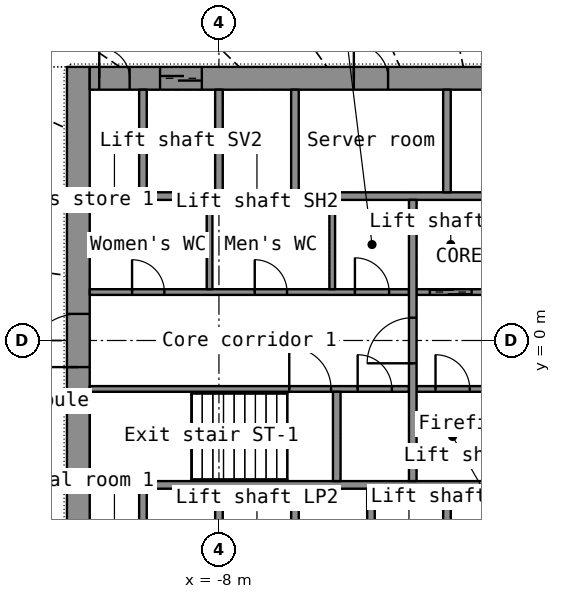
"""IFC4 building model, lengths in metres.
Left out: names, types, materials, properties, quantities, classifications, styles, units other than length and angle.
Written with IfcOpenShell. Run it as: python <this file> out.ifc"""

import sys

from ifc_helpers import new_model, si_unit, direction, frame, frame_2d, origin, place, context, subcontext, project, spatial, rectangle, extrude, element, fill, save


model = new_model("IFC4")
c1 = context("Model", 3, precision=1e-05, world=origin(), true_north=direction((0.0, 1.0)))
c2 = subcontext(c1, "Body", "Model", "MODEL_VIEW")
j1 = project(units=[si_unit("LENGTHUNIT", "METRE"), si_unit("PLANEANGLEUNIT", "RADIAN")], contexts=[c1])
p1 = place(None, origin())
s1 = spatial("IfcSite", under=j1, at=p1, CompositionType="ELEMENT")
p2 = place(p1, origin())
s2 = spatial("IfcBuilding", under=s1, at=p2, CompositionType="ELEMENT")
p3 = place(p2, frame((0.0, 0.0, 7.0)))
s3 = spatial("IfcBuildingStorey", under=s2, at=p3, CompositionType="ELEMENT", Elevation=7.0)
p4 = place(p3, frame((-11.7, -7.2, 0.0), z_axis=(0.0, 0.0, 1.0), x_axis=(0.0, 1.0, 0.0)))
e1 = element("IfcWall", 1, at=p4, inside=s3, PredefinedType="SHEAR", context=c2, shape_type="SweptSolid", body=[
    extrude(rectangle(XDim=14.4, YDim=0.6, at=frame_2d((7.2, 0.0))), origin(), (0.0, 0.0, 1.0), 6.1),
])
p5 = place(p4, frame((6.5, 0.0, 0.0)))
e2 = element("IfcOpeningElement", 2, at=p5, cuts=e1, PredefinedType="OPENING", context=c2, shape_type="SweptSolid", body=[
    extrude(rectangle(XDim=1.4, YDim=2.2, at=frame_2d((0.7, 1.1))), frame((0.0, 0.31, 0.0), z_axis=(0.0, -1.0, 0.0), x_axis=(1.0, 0.0, 0.0)), (0.0, 0.0, 1.0), 0.62),
])
p6 = place(p3, frame((-11.4, 6.9, 0.0), z_axis=(0.0, 0.0, 1.0), x_axis=(1.0, 0.0, 0.0)))
e3 = element("IfcWall", 3, at=p6, inside=s3, PredefinedType="SHEAR", context=c2, shape_type="SweptSolid", body=[
    extrude(rectangle(XDim=22.8, YDim=0.6, at=frame_2d((11.4, 0.0))), origin(), (0.0, 0.0, 1.0), 6.1),
])
p7 = place(p6, frame((1.85, 0.0, 0.0)))
e4 = element("IfcOpeningElement", 4, at=p7, cuts=e3, PredefinedType="OPENING", context=c2, shape_type="SweptSolid", body=[
    extrude(rectangle(XDim=1.1, YDim=2.2, at=frame_2d((0.55, 1.1))), frame((0.0, 0.31, 0.0), z_axis=(0.0, -1.0, 0.0), x_axis=(1.0, 0.0, 0.0)), (0.0, 0.0, 1.0), 0.62),
])
p8 = place(p6, frame((6.95, 0.0, 0.0)))
e5 = element("IfcOpeningElement", 5, at=p8, cuts=e3, PredefinedType="OPENING", context=c2, shape_type="SweptSolid", body=[
    extrude(rectangle(XDim=0.9, YDim=2.1, at=frame_2d((0.45, 1.05))), frame((0.0, 0.31, 0.0), z_axis=(0.0, -1.0, 0.0), x_axis=(1.0, 0.0, 0.0)), (0.0, 0.0, 1.0), 0.62),
])
p9 = place(p6, frame((11.95, 0.0, 0.0)))
e6 = element("IfcOpeningElement", 6, at=p9, cuts=e3, PredefinedType="OPENING", context=c2, shape_type="SweptSolid", body=[
    extrude(rectangle(XDim=0.9, YDim=2.1, at=frame_2d((0.45, 1.05))), frame((0.0, 0.31, 0.0), z_axis=(0.0, -1.0, 0.0), x_axis=(1.0, 0.0, 0.0)), (0.0, 0.0, 1.0), 0.62),
])
p10 = place(p6, frame((17.95, 0.0, 0.0)))
e7 = element("IfcOpeningElement", 7, at=p10, cuts=e3, PredefinedType="OPENING", context=c2, shape_type="SweptSolid", body=[
    extrude(rectangle(XDim=0.9, YDim=2.1, at=frame_2d((0.45, 1.05))), frame((0.0, 0.31, 0.0), z_axis=(0.0, -1.0, 0.0), x_axis=(1.0, 0.0, 0.0)), (0.0, 0.0, 1.0), 0.62),
])
p11 = place(p6, frame((0.25, 0.0, 0.0)))
e8 = element("IfcOpeningElement", 8, at=p11, cuts=e3, PredefinedType="OPENING", context=c2, shape_type="SweptSolid", body=[
    extrude(rectangle(XDim=0.8, YDim=2.05, at=frame_2d((0.4, 1.025))), frame((0.0, 0.31, 0.0), z_axis=(0.0, -1.0, 0.0), x_axis=(1.0, 0.0, 0.0)), (0.0, 0.0, 1.0), 0.62),
])
p12 = place(p6, frame((21.75, 0.0, 0.0)))
e9 = element("IfcOpeningElement", 9, at=p12, cuts=e3, PredefinedType="OPENING", context=c2, shape_type="SweptSolid", body=[
    extrude(rectangle(XDim=0.8, YDim=2.05, at=frame_2d((0.4, 1.025))), frame((0.0, 0.31, 0.0), z_axis=(0.0, -1.0, 0.0), x_axis=(1.0, 0.0, 0.0)), (0.0, 0.0, 1.0), 0.62),
])
for number, where, z_axis, x_axis in (
    (10, (-11.4, -3.8, 0.0), (0.0, 0.0, 1.0), (1.0, 0.0, 0.0)),
    (11, (-11.4, 3.8, 0.0), (0.0, 0.0, 1.0), (1.0, 0.0, 0.0)),
):
    element("IfcWall", number, at=place(p3, frame(where, z_axis=z_axis, x_axis=x_axis)), inside=s3, PredefinedType="SHEAR", context=c2, shape_type="SweptSolid", body=[
        extrude(rectangle(XDim=22.8, YDim=0.2, at=frame_2d((11.4, 0.0))), origin(), (0.0, 0.0, 1.0), 6.1),
    ])
for number, where, z_axis, x_axis in (
    (12, (-10.0, -6.6, 0.0), (0.0, 0.0, 1.0), (0.0, 1.0, 0.0)),
    (13, (-8.0, -6.6, 0.0), (0.0, 0.0, 1.0), (0.0, 1.0, 0.0)),
    (14, (-6.0, -6.6, 0.0), (0.0, 0.0, 1.0), (0.0, 1.0, 0.0)),
    (15, (-4.0, -6.6, 0.0), (0.0, 0.0, 1.0), (0.0, 1.0, 0.0)),
    (16, (-2.0, -6.6, 0.0), (0.0, 0.0, 1.0), (0.0, 1.0, 0.0)),
    (17, (-10.0, 3.9, 0.0), (0.0, 0.0, 1.0), (0.0, 1.0, 0.0)),
    (18, (-8.0, 3.9, 0.0), (0.0, 0.0, 1.0), (0.0, 1.0, 0.0)),
    (19, (-6.0, 3.9, 0.0), (0.0, 0.0, 1.0), (0.0, 1.0, 0.0)),
):
    element("IfcWall", number, at=place(p3, frame(where, z_axis=z_axis, x_axis=x_axis)), inside=s3, PredefinedType="SHEAR", context=c2, shape_type="SweptSolid", body=[
        extrude(rectangle(XDim=2.7, YDim=0.2, at=frame_2d((1.35, 0.0))), origin(), (0.0, 0.0, 1.0), 6.1),
    ])
p13 = place(p3, frame((-2.0, 3.9, 0.0), z_axis=(0.0, 0.0, 1.0), x_axis=(0.0, 1.0, 0.0)))
e20 = element("IfcWall", 20, at=p13, inside=s3, PredefinedType="PARTITIONING", context=c2, shape_type="SweptSolid", body=[
    extrude(rectangle(XDim=2.7, YDim=0.2, at=frame_2d((1.35, 0.0))), origin(), (0.0, 0.0, 1.0), 6.1),
])
p14 = place(p3, frame((-11.4, -1.275, 0.0), z_axis=(0.0, 0.0, 1.0), x_axis=(1.0, 0.0, 0.0)))
e21 = element("IfcWall", 21, at=p14, inside=s3, PredefinedType="SHEAR", context=c2, shape_type="SweptSolid", body=[
    extrude(rectangle(XDim=8.4, YDim=0.15, at=frame_2d((4.2, 0.0))), origin(), (0.0, 0.0, 1.0), 6.1),
])
p15 = place(p14, frame((5.25, 0.0, 0.0)))
e22 = element("IfcOpeningElement", 22, at=p15, cuts=e21, PredefinedType="OPENING", context=c2, shape_type="SweptSolid", body=[
    extrude(rectangle(XDim=1.1, YDim=2.15, at=frame_2d((0.55, 1.075))), frame((0.0, 0.085, 0.0), z_axis=(0.0, -1.0, 0.0), x_axis=(1.0, 0.0, 0.0)), (0.0, 0.0, 1.0), 0.17),
])
p16 = place(p14, frame((7.05, 0.0, 0.0)))
e23 = element("IfcOpeningElement", 23, at=p16, cuts=e21, PredefinedType="OPENING", context=c2, shape_type="SweptSolid", body=[
    extrude(rectangle(XDim=0.9, YDim=2.1, at=frame_2d((0.45, 1.05))), frame((0.0, 0.085, 0.0), z_axis=(0.0, -1.0, 0.0), x_axis=(1.0, 0.0, 0.0)), (0.0, 0.0, 1.0), 0.17),
])
p17 = place(p3, frame((-2.8, -1.275, 0.0), z_axis=(0.0, 0.0, 1.0), x_axis=(1.0, 0.0, 0.0)))
e24 = element("IfcWall", 24, at=p17, inside=s3, PredefinedType="SHEAR", context=c2, shape_type="SweptSolid", body=[
    extrude(rectangle(XDim=5.6, YDim=0.15, at=frame_2d((2.8, 0.0))), origin(), (0.0, 0.0, 1.0), 6.1),
])
p18 = place(p17, frame((4.15, 0.0, 0.0)))
e25 = element("IfcOpeningElement", 25, at=p18, cuts=e24, PredefinedType="OPENING", context=c2, shape_type="SweptSolid", body=[
    extrude(rectangle(XDim=1.1, YDim=2.2, at=frame_2d((0.55, 1.1))), frame((0.0, 0.085, 0.0), z_axis=(0.0, -1.0, 0.0), x_axis=(1.0, 0.0, 0.0)), (0.0, 0.0, 1.0), 0.17),
])
p19 = place(p17, frame((0.499, 0.0, 0.0)))
e26 = element("IfcOpeningElement", 26, at=p19, cuts=e24, PredefinedType="OPENING", context=c2, shape_type="SweptSolid", body=[
    extrude(rectangle(XDim=0.9, YDim=2.1, at=frame_2d((0.45, 1.05))), frame((0.0, 0.085, 0.0), z_axis=(0.0, -1.0, 0.0), x_axis=(1.0, 0.0, 0.0)), (0.0, 0.0, 1.0), 0.17),
])
p20 = place(p17, frame((2.374, 0.0, 0.0)))
e27 = element("IfcOpeningElement", 27, at=p20, cuts=e24, PredefinedType="OPENING", context=c2, shape_type="SweptSolid", body=[
    extrude(rectangle(XDim=0.9, YDim=2.1, at=frame_2d((0.45, 1.05))), frame((0.0, 0.085, 0.0), z_axis=(0.0, -1.0, 0.0), x_axis=(1.0, 0.0, 0.0)), (0.0, 0.0, 1.0), 0.17),
])
p21 = place(p3, frame((-11.4, 1.275, 0.0), z_axis=(0.0, 0.0, 1.0), x_axis=(1.0, 0.0, 0.0)))
e28 = element("IfcWall", 28, at=p21, inside=s3, PredefinedType="PARTITIONING", context=c2, shape_type="SweptSolid", body=[
    extrude(rectangle(XDim=8.4, YDim=0.15, at=frame_2d((4.2, 0.0))), origin(), (0.0, 0.0, 1.0), 6.1),
])
p22 = place(p21, frame((1.114, 0.0, 0.0)))
e29 = element("IfcOpeningElement", 29, at=p22, cuts=e28, PredefinedType="OPENING", context=c2, shape_type="SweptSolid", body=[
    extrude(rectangle(XDim=0.85, YDim=2.1, at=frame_2d((0.425, 1.05))), frame((0.0, 0.085, 0.0), z_axis=(0.0, -1.0, 0.0), x_axis=(1.0, 0.0, 0.0)), (0.0, 0.0, 1.0), 0.17),
])
p23 = place(p21, frame((4.342, 0.0, 0.0)))
e30 = element("IfcOpeningElement", 30, at=p23, cuts=e28, PredefinedType="OPENING", context=c2, shape_type="SweptSolid", body=[
    extrude(rectangle(XDim=0.85, YDim=2.1, at=frame_2d((0.425, 1.05))), frame((0.0, 0.085, 0.0), z_axis=(0.0, -1.0, 0.0), x_axis=(1.0, 0.0, 0.0)), (0.0, 0.0, 1.0), 0.17),
])
p24 = place(p21, frame((6.978, 0.0, 0.0)))
e31 = element("IfcOpeningElement", 31, at=p24, cuts=e28, PredefinedType="OPENING", context=c2, shape_type="SweptSolid", body=[
    extrude(rectangle(XDim=0.9, YDim=2.1, at=frame_2d((0.45, 1.05))), frame((0.0, 0.085, 0.0), z_axis=(0.0, -1.0, 0.0), x_axis=(1.0, 0.0, 0.0)), (0.0, 0.0, 1.0), 0.17),
])
p25 = place(p3, frame((-2.8, 1.275, 0.0), z_axis=(0.0, 0.0, 1.0), x_axis=(1.0, 0.0, 0.0)))
e32 = element("IfcWall", 32, at=p25, inside=s3, PredefinedType="SHEAR", context=c2, shape_type="SweptSolid", body=[
    extrude(rectangle(XDim=5.6, YDim=0.15, at=frame_2d((2.8, 0.0))), origin(), (0.0, 0.0, 1.0), 6.1),
])
p26 = place(p25, frame((0.35, 0.0, 0.0)))
e33 = element("IfcOpeningElement", 33, at=p26, cuts=e32, PredefinedType="OPENING", context=c2, shape_type="SweptSolid", body=[
    extrude(rectangle(XDim=1.1, YDim=2.2, at=frame_2d((0.55, 1.1))), frame((0.0, 0.085, 0.0), z_axis=(0.0, -1.0, 0.0), x_axis=(1.0, 0.0, 0.0)), (0.0, 0.0, 1.0), 0.17),
])
p27 = place(p25, frame((2.413, 0.0, 0.0)))
e34 = element("IfcOpeningElement", 34, at=p27, cuts=e32, PredefinedType="OPENING", context=c2, shape_type="SweptSolid", body=[
    extrude(rectangle(XDim=0.9, YDim=2.1, at=frame_2d((0.45, 1.05))), frame((0.0, 0.085, 0.0), z_axis=(0.0, -1.0, 0.0), x_axis=(1.0, 0.0, 0.0)), (0.0, 0.0, 1.0), 0.17),
])
p28 = place(p25, frame((4.288, 0.0, 0.0)))
e35 = element("IfcOpeningElement", 35, at=p28, cuts=e32, PredefinedType="OPENING", context=c2, shape_type="SweptSolid", body=[
    extrude(rectangle(XDim=0.9, YDim=2.1, at=frame_2d((0.45, 1.05))), frame((0.0, 0.085, 0.0), z_axis=(0.0, -1.0, 0.0), x_axis=(1.0, 0.0, 0.0)), (0.0, 0.0, 1.0), 0.17),
])
p29 = place(p3, frame((-2.9, -3.7, 0.0), z_axis=(0.0, 0.0, 1.0), x_axis=(0.0, 1.0, 0.0)))
e36 = element("IfcWall", 36, at=p29, inside=s3, PredefinedType="SHEAR", context=c2, shape_type="SweptSolid", body=[
    extrude(rectangle(XDim=7.4, YDim=0.2, at=frame_2d((3.7, 0.0))), origin(), (0.0, 0.0, 1.0), 6.1),
])
p30 = place(p29, frame((3.1, 0.0, 0.0)))
e37 = element("IfcOpeningElement", 37, at=p30, cuts=e36, PredefinedType="OPENING", context=c2, shape_type="SweptSolid", body=[
    extrude(rectangle(XDim=1.2, YDim=2.2, at=frame_2d((0.6, 1.1))), frame((0.0, 0.11, 0.0), z_axis=(0.0, -1.0, 0.0), x_axis=(1.0, 0.0, 0.0)), (0.0, 0.0, 1.0), 0.22),
])
p31 = place(p3, frame((-4.9, -3.7, 0.0), z_axis=(0.0, 0.0, 1.0), x_axis=(0.0, 1.0, 0.0)))
e38 = element("IfcWall", 38, at=p31, inside=s3, PredefinedType="SHEAR", context=c2, shape_type="SweptSolid", body=[
    extrude(rectangle(XDim=2.35, YDim=0.2, at=frame_2d((1.175, 0.0))), origin(), (0.0, 0.0, 1.0), 6.1),
])
for number, where, z_axis, x_axis in (
    (39, (-8.247, 1.35, 0.0), (0.0, 0.0, 1.0), (0.0, 1.0, 0.0)),
    (40, (-5.019, 1.35, 0.0), (0.0, 0.0, 1.0), (0.0, 1.0, 0.0)),
):
    element("IfcWall", number, at=place(p3, frame(where, z_axis=z_axis, x_axis=x_axis)), inside=s3, PredefinedType="PARTITIONING", context=c2, shape_type="SweptSolid", body=[
        extrude(rectangle(XDim=2.35, YDim=0.15, at=frame_2d((1.175, 0.0))), origin(), (0.0, 0.0, 1.0), 6.1),
    ])
p32 = place(p7, origin())
e41 = element("IfcDoor", 41, at=p32, inside=s3, OperationType="DOUBLE_DOOR_SLIDING", PredefinedType="DOOR", context=c2, shape_type="SweptSolid", body=[
    extrude(rectangle(XDim=1.1, YDim=2.2, at=frame_2d((0.55, 1.1))), frame((0.0, 0.025, 0.0), z_axis=(0.0, -1.0, 0.0), x_axis=(1.0, 0.0, 0.0)), (0.0, 0.0, 1.0), 0.05),
])
fill(e4, e41)
p33 = place(p8, origin())
e42 = element("IfcDoor", 42, at=p33, inside=s3, OperationType="SINGLE_SWING_LEFT", PredefinedType="DOOR", context=c2, shape_type="SweptSolid", body=[
    extrude(rectangle(XDim=0.9, YDim=2.1, at=frame_2d((0.45, 1.05))), frame((0.0, 0.025, 0.0), z_axis=(0.0, -1.0, 0.0), x_axis=(1.0, 0.0, 0.0)), (0.0, 0.0, 1.0), 0.05),
])
fill(e5, e42)
p34 = place(p11, origin())
e43 = element("IfcDoor", 43, at=p34, inside=s3, OperationType="SINGLE_SWING_LEFT", PredefinedType="DOOR", context=c2, shape_type="SweptSolid", body=[
    extrude(rectangle(XDim=0.8, YDim=2.05, at=frame_2d((0.4, 1.025))), frame((0.0, 0.025, 0.0), z_axis=(0.0, -1.0, 0.0), x_axis=(1.0, 0.0, 0.0)), (0.0, 0.0, 1.0), 0.05),
])
fill(e8, e43)
p35 = place(p5, origin())
e44 = element("IfcDoor", 44, at=p35, inside=s3, OperationType="DOUBLE_DOOR_SINGLE_SWING", PredefinedType="DOOR", context=c2, shape_type="SweptSolid", body=[
    extrude(rectangle(XDim=1.4, YDim=2.2, at=frame_2d((0.7, 1.1))), frame((0.0, 0.025, 0.0), z_axis=(0.0, -1.0, 0.0), x_axis=(1.0, 0.0, 0.0)), (0.0, 0.0, 1.0), 0.05),
])
fill(e2, e44)
p36 = place(p30, origin())
e45 = element("IfcDoor", 45, at=p36, inside=s3, OperationType="SINGLE_SWING_LEFT", PredefinedType="DOOR", context=c2, shape_type="SweptSolid", body=[
    extrude(rectangle(XDim=1.2, YDim=2.2, at=frame_2d((0.6, 1.1))), frame((0.0, 0.025, 0.0), z_axis=(0.0, -1.0, 0.0), x_axis=(1.0, 0.0, 0.0)), (0.0, 0.0, 1.0), 0.05),
])
fill(e37, e45)
p37 = place(p26, origin())
e46 = element("IfcDoor", 46, at=p37, inside=s3, OperationType="DOUBLE_DOOR_SLIDING", PredefinedType="DOOR", context=c2, shape_type="SweptSolid", body=[
    extrude(rectangle(XDim=1.1, YDim=2.2, at=frame_2d((0.55, 1.1))), frame((0.0, 0.025, 0.0), z_axis=(0.0, -1.0, 0.0), x_axis=(1.0, 0.0, 0.0)), (0.0, 0.0, 1.0), 0.05),
])
fill(e33, e46)
p38 = place(p15, origin())
e47 = element("IfcDoor", 47, at=p38, inside=s3, OperationType="SINGLE_SWING_LEFT", PredefinedType="DOOR", context=c2, shape_type="SweptSolid", body=[
    extrude(rectangle(XDim=1.1, YDim=2.15, at=frame_2d((0.55, 1.075))), frame((0.0, 0.025, 0.0), z_axis=(0.0, -1.0, 0.0), x_axis=(1.0, 0.0, 0.0)), (0.0, 0.0, 1.0), 0.05),
])
fill(e22, e47)
p39 = place(p22, origin())
e48 = element("IfcDoor", 48, at=p39, inside=s3, OperationType="SINGLE_SWING_LEFT", PredefinedType="DOOR", context=c2, shape_type="SweptSolid", body=[
    extrude(rectangle(XDim=0.85, YDim=2.1, at=frame_2d((0.425, 1.05))), frame((0.0, 0.025, 0.0), z_axis=(0.0, -1.0, 0.0), x_axis=(1.0, 0.0, 0.0)), (0.0, 0.0, 1.0), 0.05),
])
fill(e29, e48)
p40 = place(p23, origin())
e49 = element("IfcDoor", 49, at=p40, inside=s3, OperationType="SINGLE_SWING_LEFT", PredefinedType="DOOR", context=c2, shape_type="SweptSolid", body=[
    extrude(rectangle(XDim=0.85, YDim=2.1, at=frame_2d((0.425, 1.05))), frame((0.0, 0.025, 0.0), z_axis=(0.0, -1.0, 0.0), x_axis=(1.0, 0.0, 0.0)), (0.0, 0.0, 1.0), 0.05),
])
fill(e30, e49)
p41 = place(p24, origin())
e50 = element("IfcDoor", 50, at=p41, inside=s3, OperationType="SINGLE_SWING_LEFT", PredefinedType="DOOR", context=c2, shape_type="SweptSolid", body=[
    extrude(rectangle(XDim=0.9, YDim=2.1, at=frame_2d((0.45, 1.05))), frame((0.0, 0.025, 0.0), z_axis=(0.0, -1.0, 0.0), x_axis=(1.0, 0.0, 0.0)), (0.0, 0.0, 1.0), 0.05),
])
fill(e31, e50)
p42 = place(p19, origin())
e51 = element("IfcDoor", 51, at=p42, inside=s3, OperationType="SINGLE_SWING_LEFT", PredefinedType="DOOR", context=c2, shape_type="SweptSolid", body=[
    extrude(rectangle(XDim=0.9, YDim=2.1, at=frame_2d((0.45, 1.05))), frame((0.0, 0.025, 0.0), z_axis=(0.0, -1.0, 0.0), x_axis=(1.0, 0.0, 0.0)), (0.0, 0.0, 1.0), 0.05),
])
fill(e26, e51)
p43 = place(p16, origin())
e52 = element("IfcDoor", 52, at=p43, inside=s3, OperationType="SINGLE_SWING_LEFT", PredefinedType="DOOR", context=c2, shape_type="SweptSolid", body=[
    extrude(rectangle(XDim=0.9, YDim=2.1, at=frame_2d((0.45, 1.05))), frame((0.0, 0.025, 0.0), z_axis=(0.0, -1.0, 0.0), x_axis=(1.0, 0.0, 0.0)), (0.0, 0.0, 1.0), 0.05),
])
fill(e23, e52)
save(model, sys.argv[1])
